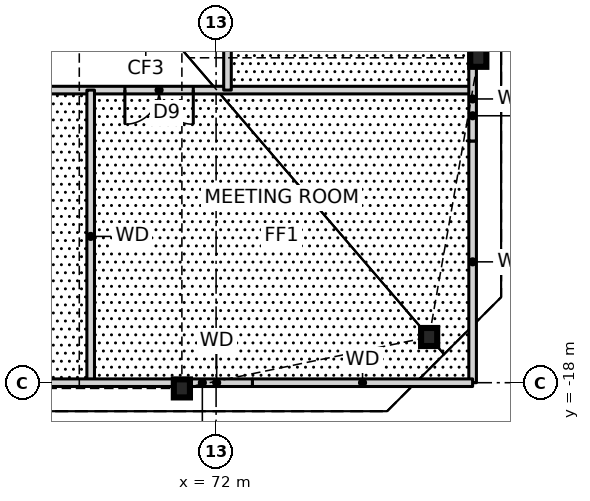
"""IFC4 building model, lengths in metres.
Left out: names, types, materials, properties, quantities, classifications, styles, units other than length and angle.
Written with IfcOpenShell. Run it as: python <this file> out.ifc"""

import sys

from ifc_helpers import new_model, si_unit, direction, frame, frame_2d, origin, origin_2d, place, context, subcontext, project, spatial, rectangle, i_section, extrude, element, fill, save


model = new_model("IFC4")
c1 = context("Model", 3, precision=1e-05, world=origin(), true_north=direction((0.0, 1.0)))
c2 = subcontext(c1, "Body", "Model", "MODEL_VIEW")
j1 = project(units=[si_unit("LENGTHUNIT", "METRE"), si_unit("PLANEANGLEUNIT", "RADIAN")], contexts=[c1])
p1 = place(None, origin())
s1 = spatial("IfcSite", under=j1, at=p1, CompositionType="ELEMENT")
p2 = place(p1, origin())
s2 = spatial("IfcBuilding", under=s1, at=p2, CompositionType="ELEMENT")
p3 = place(p2, frame((0.0, 0.0, 6.0)))
s3 = spatial("IfcBuildingStorey", under=s2, at=p3, CompositionType="ELEMENT", Elevation=6.0)
for number, where, z_axis, x_axis in (
    (1, (71.1, -18.15, 0.0), (0.0, 0.0, 1.0), (1.0, 0.0, 0.0)),
    (2, (77.606, -16.797, 0.0), (0.0, 0.0, 1.0), (1.0, 0.0, 0.0)),
    (3, (78.9, -9.45, 0.0), (0.0, 0.0, 1.0), (1.0, 0.0, 0.0)),
):
    element("IfcColumn", number, at=place(p3, frame(where, z_axis=z_axis, x_axis=x_axis)), inside=s3, PredefinedType="COLUMN", context=c2, shape_type="SweptSolid", body=[
        extrude(i_section(OverallWidth=0.424, OverallDepth=0.475, WebThickness=0.048, FlangeThickness=0.077, at=origin_2d()), origin(), (0.0, 0.0, 1.0), 4.5),
    ])
p4 = place(p3, frame((53.7, -10.3, 0.0), z_axis=(0.0, 0.0, 1.0), x_axis=(1.0, 0.0, 0.0)))
e4 = element("IfcWall", 4, at=p4, inside=s3, PredefinedType="SOLIDWALL", context=c2, shape_type="SweptSolid", body=[
    extrude(rectangle(XDim=25.05, YDim=0.2, at=frame_2d((12.525, 0.0))), origin(), (0.0, 0.0, 1.0), 4.25),
])
p5 = place(p4, frame((6.6, 0.0, 0.0)))
e5 = element("IfcOpeningElement", 5, at=p5, cuts=e4, PredefinedType="OPENING", context=c2, shape_type="SweptSolid", body=[
    extrude(rectangle(XDim=1.8, YDim=2.1, at=frame_2d((0.9, 1.05))), frame((0.0, 0.11, 0.0), z_axis=(0.0, -1.0, 0.0), x_axis=(1.0, 0.0, 0.0)), (0.0, 0.0, 1.0), 0.22),
])
p6 = place(p4, frame((15.9, 0.0, 0.0)))
e6 = element("IfcOpeningElement", 6, at=p6, cuts=e4, PredefinedType="OPENING", context=c2, shape_type="SweptSolid", body=[
    extrude(rectangle(XDim=1.8, YDim=2.1, at=frame_2d((0.9, 1.05))), frame((0.0, 0.11, 0.0), z_axis=(0.0, -1.0, 0.0), x_axis=(1.0, 0.0, 0.0)), (0.0, 0.0, 1.0), 0.22),
])
p7 = place(p3, frame((78.75, -18.0, 0.0), z_axis=(0.0, 0.0, 1.0), x_axis=(0.0, 1.0, 0.0)))
e7 = element("IfcWall", 7, at=p7, inside=s3, PredefinedType="SOLIDWALL", context=c2, shape_type="SweptSolid", body=[
    extrude(rectangle(XDim=6.361, YDim=0.2, at=frame_2d((3.181, 0.0))), origin(), (0.0, 0.0, 1.0), 4.25),
])
p8 = place(p3, frame((72.3, -10.3, 0.0), z_axis=(0.0, 0.0, 1.0), x_axis=(0.0, 1.0, 0.0)))
e8 = element("IfcWall", 8, at=p8, inside=s3, PredefinedType="SOLIDWALL", context=c2, shape_type="SweptSolid", body=[
    extrude(rectangle(XDim=28.3, YDim=0.2, at=frame_2d((14.15, 0.0))), origin(), (0.0, 0.0, 1.0), 4.25),
])
p9 = place(p8, frame((1.6, 0.0, 0.0)))
e9 = element("IfcOpeningElement", 9, at=p9, cuts=e8, PredefinedType="OPENING", context=c2, shape_type="SweptSolid", body=[
    extrude(rectangle(XDim=1.8, YDim=2.1, at=frame_2d((0.9, 1.05))), frame((0.0, 0.11, 0.0), z_axis=(0.0, -1.0, 0.0), x_axis=(1.0, 0.0, 0.0)), (0.0, 0.0, 1.0), 0.22),
])
p10 = place(p8, frame((6.35, 0.0, 0.0)))
e10 = element("IfcOpeningElement", 10, at=p10, cuts=e8, PredefinedType="OPENING", context=c2, shape_type="SweptSolid", body=[
    extrude(rectangle(XDim=0.9, YDim=2.1, at=frame_2d((0.45, 1.05))), frame((0.0, 0.11, 0.0), z_axis=(0.0, -1.0, 0.0), x_axis=(1.0, 0.0, 0.0)), (0.0, 0.0, 1.0), 0.22),
])
p11 = place(p8, frame((9.95, 0.0, 0.0)))
e11 = element("IfcOpeningElement", 11, at=p11, cuts=e8, PredefinedType="OPENING", context=c2, shape_type="SweptSolid", body=[
    extrude(rectangle(XDim=0.9, YDim=2.1, at=frame_2d((0.45, 1.05))), frame((0.0, 0.11, 0.0), z_axis=(0.0, -1.0, 0.0), x_axis=(1.0, 0.0, 0.0)), (0.0, 0.0, 1.0), 0.22),
])
p12 = place(p8, frame((12.95, 0.0, 0.0)))
e12 = element("IfcOpeningElement", 12, at=p12, cuts=e8, PredefinedType="OPENING", context=c2, shape_type="SweptSolid", body=[
    extrude(rectangle(XDim=0.9, YDim=2.1, at=frame_2d((0.45, 1.05))), frame((0.0, 0.11, 0.0), z_axis=(0.0, -1.0, 0.0), x_axis=(1.0, 0.0, 0.0)), (0.0, 0.0, 1.0), 0.22),
])
p13 = place(p8, frame((16.7, 0.0, 0.0)))
e13 = element("IfcOpeningElement", 13, at=p13, cuts=e8, PredefinedType="OPENING", context=c2, shape_type="SweptSolid", body=[
    extrude(rectangle(XDim=1.8, YDim=2.1, at=frame_2d((0.9, 1.05))), frame((0.0, 0.11, 0.0), z_axis=(0.0, -1.0, 0.0), x_axis=(1.0, 0.0, 0.0)), (0.0, 0.0, 1.0), 0.22),
])
p14 = place(p3, frame((68.7, -18.0, 0.0), z_axis=(0.0, 0.0, 1.0), x_axis=(0.0, 1.0, 0.0)))
e14 = element("IfcWall", 14, at=p14, inside=s3, PredefinedType="SOLIDWALL", context=c2, shape_type="SweptSolid", body=[
    extrude(rectangle(XDim=7.7, YDim=0.2, at=frame_2d((3.85, 0.0))), origin(), (0.0, 0.0, 1.0), 4.25),
])
p15 = place(p3, frame((54.927, -18.0, 0.0), z_axis=(0.0, 0.0, 1.0), x_axis=(1.0, 0.0, 0.0)))
e15 = element("IfcWall", 15, at=p15, inside=s3, PredefinedType="SOLIDWALL", context=c2, shape_type="SweptSolid", body=[
    extrude(rectangle(XDim=16.146, YDim=0.2, at=frame_2d((8.073, 0.0))), origin(), (0.0, 0.0, 1.0), 4.25),
])
p16 = place(p3, frame((71.073, -18.0, 0.0), z_axis=(0.0, 0.0, 1.0), x_axis=(1.0, 0.0, 0.0)))
e16 = element("IfcWall", 16, at=p16, inside=s3, PredefinedType="SOLIDWALL", context=c2, shape_type="SweptSolid", body=[
    extrude(rectangle(XDim=1.884, YDim=0.2, at=frame_2d((0.942, 0.0))), origin(), (0.0, 0.0, 1.0), 3.488),
])
p17 = place(p3, frame((72.957, -18.0, 0.0), z_axis=(0.0, 0.0, 1.0), x_axis=(1.0, 0.0, 0.0)))
e17 = element("IfcWall", 17, at=p17, inside=s3, PredefinedType="SOLIDWALL", context=c2, shape_type="SweptSolid", body=[
    extrude(rectangle(XDim=5.793, YDim=0.2, at=frame_2d((2.896, 0.0))), origin(), (0.0, 0.0, 1.0), 4.25),
])
p18 = place(p3, frame((78.75, -11.639, 0.0), z_axis=(0.0, 0.0, 1.0), x_axis=(0.0, 1.0, 0.0)))
e18 = element("IfcWall", 18, at=p18, inside=s3, PredefinedType="SOLIDWALL", context=c2, shape_type="SweptSolid", body=[
    extrude(rectangle(XDim=2.212, YDim=0.2, at=frame_2d((1.106, 0.0))), origin(), (0.0, 0.0, 1.0), 3.488),
])
p19 = place(p3, frame((78.75, -9.427, 0.0), z_axis=(0.0, 0.0, 1.0), x_axis=(0.0, 1.0, 0.0)))
e19 = element("IfcWall", 19, at=p19, inside=s3, PredefinedType="SOLIDWALL", context=c2, shape_type="SweptSolid", body=[
    extrude(rectangle(XDim=18.854, YDim=0.2, at=frame_2d((9.427, 0.0))), origin(), (0.0, 0.0, 1.0), 4.25),
])
p20 = place(p6, frame((1.8, 0.0, 0.0), z_axis=(0.0, 0.0, 1.0), x_axis=(-1.0, 0.0, 0.0)))
e20 = element("IfcDoor", 20, at=p20, inside=s3, OperationType="DOUBLE_DOOR_SINGLE_SWING", PredefinedType="DOOR", context=c2, shape_type="SweptSolid", body=[
    extrude(rectangle(XDim=1.8, YDim=2.1, at=frame_2d((0.9, 1.05))), frame((0.0, 0.025, 0.0), z_axis=(0.0, -1.0, 0.0), x_axis=(1.0, 0.0, 0.0)), (0.0, 0.0, 1.0), 0.05),
])
fill(e6, e20)
save(model, sys.argv[1])
